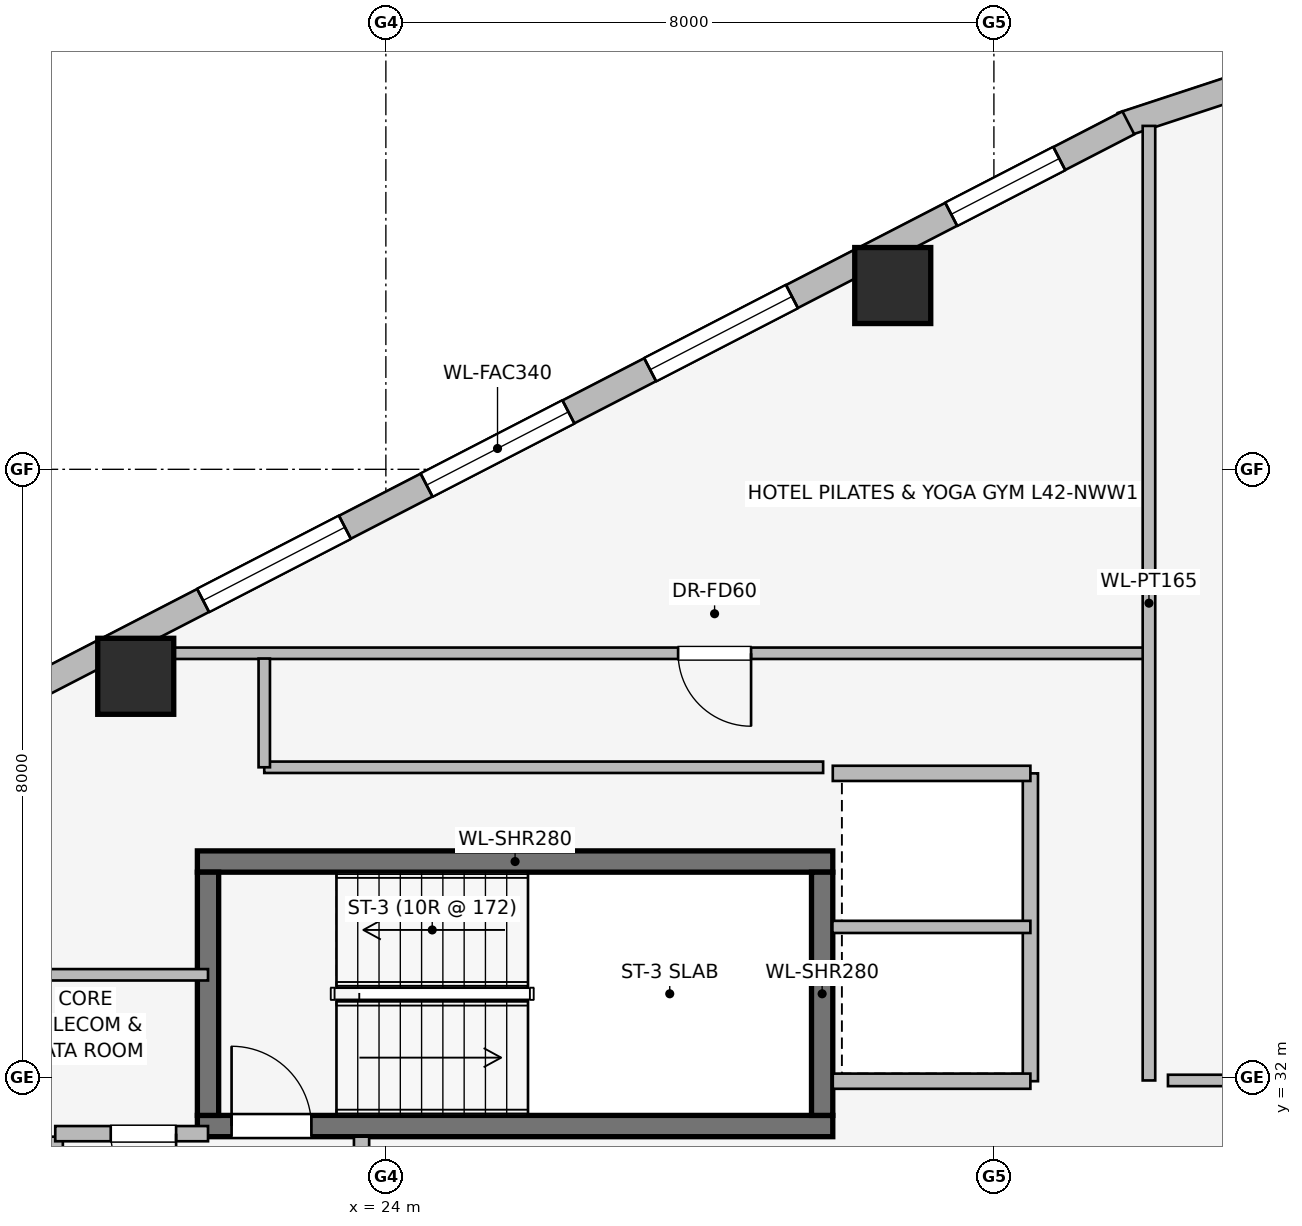
"""IFC4 building model, lengths in metres.
Left out: names, types, materials, properties, quantities, classifications, styles, units other than length and angle.
Written with IfcOpenShell. Run it as: python <this file> out.ifc"""

import sys

from ifc_helpers import new_model, si_unit, direction, frame, frame_2d, origin, origin_2d, place, context, subcontext, project, spatial, rectangle, extrude, element, fill, save


model = new_model("IFC4")
c1 = context("Model", 3, precision=1e-05, world=origin(), true_north=direction((0.0, 1.0)))
c2 = subcontext(c1, "Body", "Model", "MODEL_VIEW")
j1 = project(units=[si_unit("LENGTHUNIT", "METRE"), si_unit("PLANEANGLEUNIT", "RADIAN")], contexts=[c1])
p1 = place(None, origin())
s1 = spatial("IfcSite", under=j1, at=p1, CompositionType="ELEMENT")
p2 = place(p1, origin())
s2 = spatial("IfcBuilding", under=s1, at=p2, CompositionType="ELEMENT")
p3 = place(p2, frame((0.0, 0.0, 156.75)))
s3 = spatial("IfcBuildingStorey", under=s2, at=p3, CompositionType="ELEMENT", Elevation=156.75)
p4 = place(p3, frame((21.52, 31.36, 0.0), z_axis=(0.0, 0.0, 1.0), x_axis=(1.0, 0.0, 0.0)))
e1 = element("IfcWall", 1, at=p4, inside=s3, PredefinedType="SHEAR", context=c2, shape_type="SweptSolid", body=[
    extrude(rectangle(XDim=8.36, YDim=0.28, at=frame_2d((4.18, 0.0))), origin(), (0.0, 0.0, 1.0), 3.45),
])
p5 = place(p4, frame((0.45, 0.0, 0.0)))
e2 = element("IfcOpeningElement", 2, at=p5, cuts=e1, PredefinedType="OPENING", context=c2, shape_type="SweptSolid", body=[
    extrude(rectangle(XDim=1.05, YDim=2.0, at=frame_2d((0.525, 1.0))), frame((0.0, 0.15, 0.0), z_axis=(0.0, -1.0, 0.0), x_axis=(1.0, 0.0, 0.0)), (0.0, 0.0, 1.0), 0.3),
])
p6 = place(p3, frame((29.88, 34.84, 0.0), z_axis=(0.0, 0.0, 1.0), x_axis=(-1.0, 0.0, 0.0)))
e3 = element("IfcWall", 3, at=p6, inside=s3, PredefinedType="SHEAR", context=c2, shape_type="SweptSolid", body=[
    extrude(rectangle(XDim=8.36, YDim=0.28, at=frame_2d((4.18, 0.0))), origin(), (0.0, 0.0, 1.0), 3.45),
])
for number, where, z_axis, x_axis in (
    (4, (21.66, 34.7, 0.0), (0.0, 0.0, 1.0), (0.0, -1.0, 0.0)),
    (5, (29.74, 31.5, 0.0), (0.0, 0.0, 1.0), (0.0, 1.0, 0.0)),
):
    element("IfcWall", number, at=place(p3, frame(where, z_axis=z_axis, x_axis=x_axis)), inside=s3, PredefinedType="SHEAR", context=c2, shape_type="SweptSolid", body=[
        extrude(rectangle(XDim=3.2, YDim=0.28, at=frame_2d((1.6, 0.0))), origin(), (0.0, 0.0, 1.0), 3.45),
    ])
for number, where, z_axis, x_axis in (
    (6, (30.669, 42.418, 0.0), (0.0, 0.0, 1.0), (1.0, 0.0, 0.0)),
    (7, (20.709, 37.277, 0.0), (0.0, 0.0, 1.0), (1.0, 0.0, 0.0)),
):
    element("IfcColumn", number, at=place(p3, frame(where, z_axis=z_axis, x_axis=x_axis)), inside=s3, PredefinedType="COLUMN", context=c2, shape_type="SweptSolid", body=[
        extrude(rectangle(XDim=1.0, YDim=1.0, at=origin_2d()), origin(), (0.0, 0.0, 1.0), 3.45),
    ])
p7 = place(p3, frame((33.681, 44.532, 0.0), z_axis=(0.0, 0.0, 1.0), x_axis=(0.949937416267, 0.312440242569, 0.0)))
e8 = element("IfcWall", 8, at=p7, inside=s3, PredefinedType="STANDARD", context=c2, shape_type="SweptSolid", body=[
    extrude(rectangle(XDim=1.722, YDim=0.33, at=frame_2d((0.861, 0.0))), origin(), (0.0, 0.0, 1.0), 3.19),
])
p8 = place(p3, frame((17.169, 35.99, 0.0), z_axis=(0.0, 0.0, 1.0), x_axis=(0.888613612362, 0.458656568606, 0.0)))
e9 = element("IfcWall", 9, at=p8, inside=s3, PredefinedType="STANDARD", context=c2, shape_type="SweptSolid", body=[
    extrude(rectangle(XDim=18.681, YDim=0.34, at=frame_2d((9.34, 0.0))), origin(), (0.0, 0.0, 1.0), 3.19),
])
p9 = place(p8, frame((1.023, 0.0, 0.75)))
e10 = element("IfcOpeningElement", 10, at=p9, cuts=e9, PredefinedType="OPENING", context=c2, shape_type="SweptSolid", body=[
    extrude(rectangle(XDim=1.6, YDim=1.55, at=frame_2d((0.8, 0.775))), frame((0.0, 0.18, 0.0), z_axis=(0.0, -1.0, 0.0), x_axis=(1.0, 0.0, 0.0)), (0.0, 0.0, 1.0), 0.36),
])
p10 = place(p8, frame((4.981, 0.0, 0.75)))
e11 = element("IfcOpeningElement", 11, at=p10, cuts=e9, PredefinedType="OPENING", context=c2, shape_type="SweptSolid", body=[
    extrude(rectangle(XDim=2.1, YDim=1.5, at=frame_2d((1.05, 0.75))), frame((0.0, 0.18, 0.0), z_axis=(0.0, -1.0, 0.0), x_axis=(1.0, 0.0, 0.0)), (0.0, 0.0, 1.0), 0.36),
])
p11 = place(p8, frame((8.29, 0.0, 0.75)))
e12 = element("IfcOpeningElement", 12, at=p11, cuts=e9, PredefinedType="OPENING", context=c2, shape_type="SweptSolid", body=[
    extrude(rectangle(XDim=2.1, YDim=1.5, at=frame_2d((1.05, 0.75))), frame((0.0, 0.18, 0.0), z_axis=(0.0, -1.0, 0.0), x_axis=(1.0, 0.0, 0.0)), (0.0, 0.0, 1.0), 0.36),
])
p12 = place(p8, frame((11.6, 0.0, 0.75)))
e13 = element("IfcOpeningElement", 13, at=p12, cuts=e9, PredefinedType="OPENING", context=c2, shape_type="SweptSolid", body=[
    extrude(rectangle(XDim=2.1, YDim=1.5, at=frame_2d((1.05, 0.75))), frame((0.0, 0.18, 0.0), z_axis=(0.0, -1.0, 0.0), x_axis=(1.0, 0.0, 0.0)), (0.0, 0.0, 1.0), 0.36),
])
p13 = place(p8, frame((16.058, 0.0, 0.75)))
e14 = element("IfcOpeningElement", 14, at=p13, cuts=e9, PredefinedType="OPENING", context=c2, shape_type="SweptSolid", body=[
    extrude(rectangle(XDim=1.6, YDim=1.55, at=frame_2d((0.8, 0.775))), frame((0.0, 0.18, 0.0), z_axis=(0.0, -1.0, 0.0), x_axis=(1.0, 0.0, 0.0)), (0.0, 0.0, 1.0), 0.36),
])
p14 = place(p3, frame((19.65, 25.68, 0.0), z_axis=(0.0, 0.0, 1.0), x_axis=(0.0, 1.0, 0.0)))
e15 = element("IfcWall", 15, at=p14, inside=s3, PredefinedType="PARTITIONING", context=c2, shape_type="SweptSolid", body=[
    extrude(rectangle(XDim=5.54, YDim=0.2, at=frame_2d((2.77, 0.0))), origin(), (0.0, 0.0, 1.0), 3.19),
])
p15 = place(p14, frame((0.62, 0.0, 0.0)))
e16 = element("IfcOpeningElement", 16, at=p15, cuts=e15, PredefinedType="OPENING", context=c2, shape_type="SweptSolid", body=[
    extrude(rectangle(XDim=1.1, YDim=2.2, at=frame_2d((0.55, 1.1))), frame((0.0, 0.11, 0.0), z_axis=(0.0, -1.0, 0.0), x_axis=(1.0, 0.0, 0.0)), (0.0, 0.0, 1.0), 0.22),
])
p16 = place(p14, frame((3.12, 0.0, 0.0)))
e17 = element("IfcOpeningElement", 17, at=p16, cuts=e15, PredefinedType="OPENING", context=c2, shape_type="SweptSolid", body=[
    extrude(rectangle(XDim=1.1, YDim=2.2, at=frame_2d((0.55, 1.1))), frame((0.0, 0.11, 0.0), z_axis=(0.0, -1.0, 0.0), x_axis=(1.0, 0.0, 0.0)), (0.0, 0.0, 1.0), 0.22),
])
p17 = place(p3, frame((23.68, 25.68, 0.0), z_axis=(0.0, 0.0, 1.0), x_axis=(0.0, 1.0, 0.0)))
e18 = element("IfcWall", 18, at=p17, inside=s3, PredefinedType="PARTITIONING", context=c2, shape_type="SweptSolid", body=[
    extrude(rectangle(XDim=5.54, YDim=0.2, at=frame_2d((2.77, 0.0))), origin(), (0.0, 0.0, 1.0), 3.19),
])
p18 = place(p17, frame((1.8, 0.0, 0.0)))
e19 = element("IfcOpeningElement", 19, at=p18, cuts=e18, PredefinedType="OPENING", context=c2, shape_type="SweptSolid", body=[
    extrude(rectangle(XDim=1.05, YDim=2.0, at=frame_2d((0.525, 1.0))), frame((0.0, 0.11, 0.0), z_axis=(0.0, -1.0, 0.0), x_axis=(1.0, 0.0, 0.0)), (0.0, 0.0, 1.0), 0.22),
])
p19 = place(p3, frame((21.66, 31.26, 0.0), z_axis=(0.0, 0.0, 1.0), x_axis=(-1.0, 0.0, 0.0)))
e20 = element("IfcWall", 20, at=p19, inside=s3, PredefinedType="PARTITIONING", context=c2, shape_type="SweptSolid", body=[
    extrude(rectangle(XDim=2.01, YDim=0.2, at=frame_2d((1.005, 0.0))), origin(), (0.0, 0.0, 1.0), 3.19),
])
p20 = place(p19, frame((0.42, 0.0, 0.0)))
e21 = element("IfcOpeningElement", 21, at=p20, cuts=e20, PredefinedType="OPENING", context=c2, shape_type="SweptSolid", body=[
    extrude(rectangle(XDim=0.86, YDim=2.0, at=frame_2d((0.43, 1.0))), frame((0.0, 0.11, 0.0), z_axis=(0.0, -1.0, 0.0), x_axis=(1.0, 0.0, 0.0)), (0.0, 0.0, 1.0), 0.22),
])
p21 = place(p3, frame((32.48, 31.95, 0.0), z_axis=(0.0, 0.0, 1.0), x_axis=(0.0, 1.0, 0.0)))
e22 = element("IfcWall", 22, at=p21, inside=s3, PredefinedType="PARTITIONING", context=c2, shape_type="SweptSolid", body=[
    extrude(rectangle(XDim=4.05, YDim=0.2, at=frame_2d((2.025, 0.0))), origin(), (0.0, 0.0, 1.0), 3.19),
])
for number, where, z_axis, x_axis in (
    (23, (29.88, 36.0, 0.0), (0.0, 0.0, 1.0), (1.0, 0.0, 0.0)),
    (24, (32.48, 31.95, 0.0), (0.0, 0.0, 1.0), (-1.0, 0.0, 0.0)),
):
    element("IfcWall", number, at=place(p3, frame(where, z_axis=z_axis, x_axis=x_axis)), inside=s3, PredefinedType="PARTITIONING", context=c2, shape_type="SweptSolid", body=[
        extrude(rectangle(XDim=2.6, YDim=0.2, at=frame_2d((1.3, 0.0))), origin(), (0.0, 0.0, 1.0), 3.19),
    ])
p22 = place(p3, frame((29.875, 33.98, 0.0), z_axis=(0.0, 0.0, 1.0), x_axis=(1.0, 0.0, 0.0)))
e25 = element("IfcWall", 25, at=p22, inside=s3, PredefinedType="PARTITIONING", context=c2, shape_type="SweptSolid", body=[
    extrude(rectangle(XDim=2.605, YDim=0.16, at=frame_2d((1.302, 0.0))), origin(), (0.0, 0.0, 1.0), 3.19),
])
p23 = place(p3, frame((21.66, 33.35, 0.0), z_axis=(0.0, 0.0, 1.0), x_axis=(-1.0, 0.0, 0.0)))
e26 = element("IfcWall", 26, at=p23, inside=s3, PredefinedType="PARTITIONING", context=c2, shape_type="SweptSolid", body=[
    extrude(rectangle(XDim=2.56, YDim=0.15, at=frame_2d((1.28, 0.0))), origin(), (0.0, 0.0, 1.0), 3.19),
])
p24 = place(p3, frame((34.0, 37.58, 0.0), z_axis=(0.0, 0.0, 1.0), x_axis=(-1.0, 0.0, 0.0)))
e27 = element("IfcWall", 27, at=p24, inside=s3, PredefinedType="PARTITIONING", context=c2, shape_type="SweptSolid", body=[
    extrude(rectangle(XDim=13.707, YDim=0.15, at=frame_2d((6.854, 0.0))), origin(), (0.0, 0.0, 1.0), 2.582),
])
p25 = place(p24, frame((5.195, 0.0, 0.0)))
e28 = element("IfcOpeningElement", 28, at=p25, cuts=e27, PredefinedType="OPENING", context=c2, shape_type="SweptSolid", body=[
    extrude(rectangle(XDim=0.96, YDim=2.0, at=frame_2d((0.48, 1.0))), frame((0.0, 0.085, 0.0), z_axis=(0.0, -1.0, 0.0), x_axis=(1.0, 0.0, 0.0)), (0.0, 0.0, 1.0), 0.17),
])
p26 = place(p3, frame((34.04, 31.96, 0.0), z_axis=(0.0, 0.0, 1.0), x_axis=(0.0, 1.0, 0.0)))
e29 = element("IfcWall", 29, at=p26, inside=s3, PredefinedType="PARTITIONING", context=c2, shape_type="SweptSolid", body=[
    extrude(rectangle(XDim=12.558, YDim=0.165, at=frame_2d((6.279, 0.0))), origin(), (0.0, 0.0, 1.0), 3.19),
])
p27 = place(p3, frame((41.737, 31.96, 0.0), z_axis=(0.0, 0.0, 1.0), x_axis=(-1.0, 0.0, 0.0)))
e30 = element("IfcWall", 30, at=p27, inside=s3, PredefinedType="PARTITIONING", context=c2, shape_type="SweptSolid", body=[
    extrude(rectangle(XDim=7.447, YDim=0.15, at=frame_2d((3.724, 0.0))), origin(), (0.0, 0.0, 1.0), 3.19),
])
p28 = place(p27, frame((3.187, 0.0, 0.0)))
e31 = element("IfcOpeningElement", 31, at=p28, cuts=e30, PredefinedType="OPENING", context=c2, shape_type="SweptSolid", body=[
    extrude(rectangle(XDim=0.96, YDim=2.0, at=frame_2d((0.48, 1.0))), frame((0.0, 0.085, 0.0), z_axis=(0.0, -1.0, 0.0), x_axis=(1.0, 0.0, 0.0)), (0.0, 0.0, 1.0), 0.17),
])
p29 = place(p3, frame((29.753, 36.08, 0.0), z_axis=(0.0, 0.0, 1.0), x_axis=(-1.0, 0.0, 0.0)))
e32 = element("IfcWall", 32, at=p29, inside=s3, PredefinedType="PARTITIONING", context=c2, shape_type="SweptSolid", body=[
    extrude(rectangle(XDim=7.353, YDim=0.15, at=frame_2d((3.677, 0.0))), origin(), (0.0, 0.0, 1.0), 2.582),
])
p30 = place(p3, frame((22.4, 36.08, 0.0), z_axis=(0.0, 0.0, 1.0), x_axis=(0.0, 1.0, 0.0)))
e33 = element("IfcWall", 33, at=p30, inside=s3, PredefinedType="PARTITIONING", context=c2, shape_type="SweptSolid", body=[
    extrude(rectangle(XDim=1.43, YDim=0.15, at=frame_2d((0.715, 0.0))), origin(), (0.0, 0.0, 1.0), 3.19),
])
p31 = place(p10, origin())
e34 = element("IfcWindow", 34, at=p31, inside=s3, PartitioningType="SINGLE_PANEL", PredefinedType="WINDOW", context=c2, shape_type="SweptSolid", body=[
    extrude(rectangle(XDim=2.1, YDim=1.5, at=frame_2d((1.05, 0.75))), frame((0.0, 0.03, 0.0), z_axis=(0.0, -1.0, 0.0), x_axis=(1.0, 0.0, 0.0)), (0.0, 0.0, 1.0), 0.06),
])
fill(e11, e34)
p32 = place(p11, origin())
e35 = element("IfcWindow", 35, at=p32, inside=s3, PartitioningType="SINGLE_PANEL", PredefinedType="WINDOW", context=c2, shape_type="SweptSolid", body=[
    extrude(rectangle(XDim=2.1, YDim=1.5, at=frame_2d((1.05, 0.75))), frame((0.0, 0.03, 0.0), z_axis=(0.0, -1.0, 0.0), x_axis=(1.0, 0.0, 0.0)), (0.0, 0.0, 1.0), 0.06),
])
fill(e12, e35)
p33 = place(p12, origin())
e36 = element("IfcWindow", 36, at=p33, inside=s3, PartitioningType="SINGLE_PANEL", PredefinedType="WINDOW", context=c2, shape_type="SweptSolid", body=[
    extrude(rectangle(XDim=2.1, YDim=1.5, at=frame_2d((1.05, 0.75))), frame((0.0, 0.03, 0.0), z_axis=(0.0, -1.0, 0.0), x_axis=(1.0, 0.0, 0.0)), (0.0, 0.0, 1.0), 0.06),
])
fill(e13, e36)
p34 = place(p13, origin())
e37 = element("IfcWindow", 37, at=p34, inside=s3, PartitioningType="SINGLE_PANEL", PredefinedType="WINDOW", context=c2, shape_type="SweptSolid", body=[
    extrude(rectangle(XDim=1.6, YDim=1.55, at=frame_2d((0.8, 0.775))), frame((0.0, 0.03, 0.0), z_axis=(0.0, -1.0, 0.0), x_axis=(1.0, 0.0, 0.0)), (0.0, 0.0, 1.0), 0.06),
])
fill(e14, e37)
p35 = place(p5, origin())
e38 = element("IfcDoor", 38, at=p35, inside=s3, OperationType="SINGLE_SWING_LEFT", PredefinedType="DOOR", context=c2, shape_type="SweptSolid", body=[
    extrude(rectangle(XDim=1.05, YDim=2.0, at=frame_2d((0.525, 1.0))), frame((0.0, 0.025, 0.0), z_axis=(0.0, -1.0, 0.0), x_axis=(1.0, 0.0, 0.0)), (0.0, 0.0, 1.0), 0.05),
])
fill(e2, e38)
p36 = place(p20, origin())
e39 = element("IfcDoor", 39, at=p36, inside=s3, OperationType="SINGLE_SWING_LEFT", PredefinedType="DOOR", context=c2, shape_type="SweptSolid", body=[
    extrude(rectangle(XDim=0.86, YDim=2.0, at=frame_2d((0.43, 1.0))), frame((0.0, 0.025, 0.0), z_axis=(0.0, -1.0, 0.0), x_axis=(1.0, 0.0, 0.0)), (0.0, 0.0, 1.0), 0.05),
])
fill(e21, e39)
p37 = place(p25, origin())
e40 = element("IfcDoor", 40, at=p37, inside=s3, OperationType="SINGLE_SWING_LEFT", PredefinedType="DOOR", context=c2, shape_type="SweptSolid", body=[
    extrude(rectangle(XDim=0.96, YDim=2.0, at=frame_2d((0.48, 1.0))), frame((0.0, 0.025, 0.0), z_axis=(0.0, -1.0, 0.0), x_axis=(1.0, 0.0, 0.0)), (0.0, 0.0, 1.0), 0.05),
])
fill(e28, e40)
save(model, sys.argv[1])
